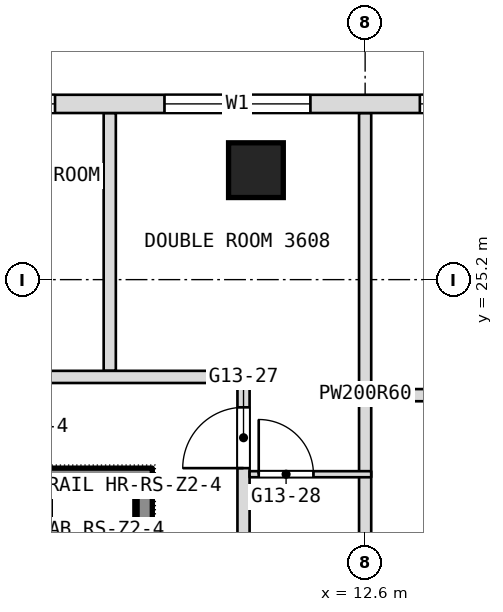
"""IFC4 building model, lengths in metres.
Left out: names, types, materials, properties, quantities, classifications, styles, units other than length and angle.
Written with IfcOpenShell. Run it as: python <this file> out.ifc"""

import sys

from ifc_helpers import new_model, si_unit, direction, frame, frame_2d, origin, origin_2d, place, context, subcontext, project, spatial, rectangle, extrude, element, fill, save


model = new_model("IFC4")
c1 = context("Model", 3, precision=1e-05, world=origin(), true_north=direction((0.0, 1.0)))
c2 = subcontext(c1, "Body", "Model", "MODEL_VIEW")
j1 = project(units=[si_unit("LENGTHUNIT", "METRE"), si_unit("PLANEANGLEUNIT", "RADIAN")], contexts=[c1])
p1 = place(None, origin())
s1 = spatial("IfcSite", under=j1, at=p1, CompositionType="ELEMENT")
p2 = place(p1, origin())
s2 = spatial("IfcBuilding", under=s1, at=p2, CompositionType="ELEMENT")
p3 = place(p2, frame((0.0, 0.0, 155.3)))
s3 = spatial("IfcBuildingStorey", under=s2, at=p3, CompositionType="ELEMENT", Elevation=155.3)
p4 = place(p3, frame((10.804, 27.0, 0.0), z_axis=(0.0, 0.0, 1.0), x_axis=(1.0, 0.0, 0.0)))
e1 = element("IfcColumn", 1, at=p4, inside=s3, PredefinedType="COLUMN", context=c2, shape_type="SweptSolid", body=[
    extrude(rectangle(XDim=0.9, YDim=0.9, at=origin_2d()), origin(), (0.0, 0.0, 1.0), 3.6),
])
p5 = place(p3, frame((12.6, 18.7, 0.0), z_axis=(0.0, 0.0, 1.0), x_axis=(0.0, 1.0, 0.0)))
e2 = element("IfcWall", 2, at=p5, inside=s3, PredefinedType="PARTITIONING", context=c2, shape_type="SweptSolid", body=[
    extrude(rectangle(XDim=9.24, YDim=0.2, at=frame_2d((4.62, 0.0))), origin(), (0.0, 0.0, 1.0), 3.34),
])
p6 = place(p3, frame((10.6, 18.5, 0.0), z_axis=(0.0, 0.0, 1.0), x_axis=(0.0, 1.0, 0.0)))
e3 = element("IfcWall", 3, at=p6, inside=s3, PredefinedType="PARTITIONING", context=c2, shape_type="SweptSolid", body=[
    extrude(rectangle(XDim=5.0, YDim=0.2, at=frame_2d((2.5, 0.0))), origin(), (0.0, 0.0, 1.0), 3.34),
])
p7 = place(p6, frame((3.6, 0.0, 0.0)))
e4 = element("IfcOpeningElement", 4, at=p7, cuts=e3, PredefinedType="OPENING", context=c2, shape_type="SweptSolid", body=[
    extrude(rectangle(XDim=1.0, YDim=2.1, at=frame_2d((0.5, 1.05))), frame((0.0, 0.1, 0.0), z_axis=(0.0, -1.0, 0.0), x_axis=(1.0, 0.0, 0.0)), (0.0, 0.0, 1.0), 0.2),
])
p8 = place(p3, frame((8.4, 23.7, 0.0), z_axis=(0.0, 0.0, 1.0), x_axis=(0.0, 1.0, 0.0)))
e5 = element("IfcWall", 5, at=p8, inside=s3, PredefinedType="PARTITIONING", context=c2, shape_type="SweptSolid", body=[
    extrude(rectangle(XDim=4.24, YDim=0.2, at=frame_2d((2.12, 0.0))), origin(), (0.0, 0.0, 1.0), 3.34),
])
p9 = place(p3, frame((10.7, 22.0, 0.0), z_axis=(0.0, 0.0, 1.0), x_axis=(1.0, 0.0, 0.0)))
e6 = element("IfcWall", 6, at=p9, inside=s3, PredefinedType="PARTITIONING", context=c2, shape_type="SweptSolid", body=[
    extrude(rectangle(XDim=2.0, YDim=0.1, at=frame_2d((1.0, 0.0))), origin(), (0.0, 0.0, 1.0), 3.34),
])
p10 = place(p9, frame((0.15, 0.0, 0.0)))
e7 = element("IfcOpeningElement", 7, at=p10, cuts=e6, PredefinedType="OPENING", context=c2, shape_type="SweptSolid", body=[
    extrude(rectangle(XDim=0.9, YDim=2.1, at=frame_2d((0.45, 1.05))), frame((0.0, 0.05, 0.0), z_axis=(0.0, -1.0, 0.0), x_axis=(1.0, 0.0, 0.0)), (0.0, 0.0, 1.0), 0.1),
])
p11 = place(p3, frame((12.7, 23.3, 0.0), z_axis=(0.0, 0.0, 1.0), x_axis=(1.0, 0.0, 0.0)))
e8 = element("IfcWall", 8, at=p11, inside=s3, PredefinedType="PARTITIONING", context=c2, shape_type="SweptSolid", body=[
    extrude(rectangle(XDim=4.0, YDim=0.2, at=frame_2d((2.0, 0.0))), origin(), (0.0, 0.0, 1.0), 3.34),
])
p12 = place(p3, frame((1.5, 23.6, 0.0), z_axis=(0.0, 0.0, 1.0), x_axis=(1.0, 0.0, 0.0)))
e9 = element("IfcWall", 9, at=p12, inside=s3, PredefinedType="PARTITIONING", context=c2, shape_type="SweptSolid", body=[
    extrude(rectangle(XDim=9.2, YDim=0.2, at=frame_2d((4.6, 0.0))), origin(), (0.0, 0.0, 1.0), 3.34),
])
p13 = place(p12, frame((4.3, 0.0, 0.0)))
e10 = element("IfcOpeningElement", 10, at=p13, cuts=e9, PredefinedType="OPENING", context=c2, shape_type="SweptSolid", body=[
    extrude(rectangle(XDim=1.0, YDim=2.1, at=frame_2d((0.5, 1.05))), frame((0.0, 0.1, 0.0), z_axis=(0.0, -1.0, 0.0), x_axis=(1.0, 0.0, 0.0)), (0.0, 0.0, 1.0), 0.2),
])
p14 = place(p3, frame((21.306, 28.09, 0.0), z_axis=(0.0, 0.0, 1.0), x_axis=(-1.0, 0.0, 0.0)))
e11 = element("IfcWall", 11, at=p14, inside=s3, PredefinedType="NOTDEFINED", context=c2, shape_type="SweptSolid", body=[
    extrude(rectangle(XDim=42.612, YDim=0.3, at=frame_2d((21.306, 0.0))), origin(), (0.0, 0.0, 1.0), 3.6),
])
p15 = place(p14, frame((5.406, 0.0, 0.9)))
e12 = element("IfcOpeningElement", 12, at=p15, cuts=e11, PredefinedType="OPENING", context=c2, shape_type="SweptSolid", body=[
    extrude(rectangle(XDim=2.4, YDim=2.1, at=frame_2d((1.2, 1.05))), frame((0.0, 0.15, 0.0), z_axis=(0.0, -1.0, 0.0), x_axis=(1.0, 0.0, 0.0)), (0.0, 0.0, 1.0), 0.3),
])
p16 = place(p14, frame((9.606, 0.0, 0.9)))
e13 = element("IfcOpeningElement", 13, at=p16, cuts=e11, PredefinedType="OPENING", context=c2, shape_type="SweptSolid", body=[
    extrude(rectangle(XDim=2.4, YDim=2.1, at=frame_2d((1.2, 1.05))), frame((0.0, 0.15, 0.0), z_axis=(0.0, -1.0, 0.0), x_axis=(1.0, 0.0, 0.0)), (0.0, 0.0, 1.0), 0.3),
])
p17 = place(p14, frame((13.806, 0.0, 0.9)))
e14 = element("IfcOpeningElement", 14, at=p17, cuts=e11, PredefinedType="OPENING", context=c2, shape_type="SweptSolid", body=[
    extrude(rectangle(XDim=2.4, YDim=2.1, at=frame_2d((1.2, 1.05))), frame((0.0, 0.15, 0.0), z_axis=(0.0, -1.0, 0.0), x_axis=(1.0, 0.0, 0.0)), (0.0, 0.0, 1.0), 0.3),
])
p18 = place(p14, frame((18.006, 0.0, 0.9)))
e15 = element("IfcOpeningElement", 15, at=p18, cuts=e11, PredefinedType="OPENING", context=c2, shape_type="SweptSolid", body=[
    extrude(rectangle(XDim=2.4, YDim=2.1, at=frame_2d((1.2, 1.05))), frame((0.0, 0.15, 0.0), z_axis=(0.0, -1.0, 0.0), x_axis=(1.0, 0.0, 0.0)), (0.0, 0.0, 1.0), 0.3),
])
p19 = place(p14, frame((22.206, 0.0, 0.9)))
e16 = element("IfcOpeningElement", 16, at=p19, cuts=e11, PredefinedType="OPENING", context=c2, shape_type="SweptSolid", body=[
    extrude(rectangle(XDim=2.4, YDim=2.1, at=frame_2d((1.2, 1.05))), frame((0.0, 0.15, 0.0), z_axis=(0.0, -1.0, 0.0), x_axis=(1.0, 0.0, 0.0)), (0.0, 0.0, 1.0), 0.3),
])
p20 = place(p14, frame((26.406, 0.0, 0.9)))
e17 = element("IfcOpeningElement", 17, at=p20, cuts=e11, PredefinedType="OPENING", context=c2, shape_type="SweptSolid", body=[
    extrude(rectangle(XDim=2.4, YDim=2.1, at=frame_2d((1.2, 1.05))), frame((0.0, 0.15, 0.0), z_axis=(0.0, -1.0, 0.0), x_axis=(1.0, 0.0, 0.0)), (0.0, 0.0, 1.0), 0.3),
])
p21 = place(p14, frame((30.606, 0.0, 0.9)))
e18 = element("IfcOpeningElement", 18, at=p21, cuts=e11, PredefinedType="OPENING", context=c2, shape_type="SweptSolid", body=[
    extrude(rectangle(XDim=2.4, YDim=2.1, at=frame_2d((1.2, 1.05))), frame((0.0, 0.15, 0.0), z_axis=(0.0, -1.0, 0.0), x_axis=(1.0, 0.0, 0.0)), (0.0, 0.0, 1.0), 0.3),
])
p22 = place(p14, frame((34.806, 0.0, 0.9)))
e19 = element("IfcOpeningElement", 19, at=p22, cuts=e11, PredefinedType="OPENING", context=c2, shape_type="SweptSolid", body=[
    extrude(rectangle(XDim=2.4, YDim=2.1, at=frame_2d((1.2, 1.05))), frame((0.0, 0.15, 0.0), z_axis=(0.0, -1.0, 0.0), x_axis=(1.0, 0.0, 0.0)), (0.0, 0.0, 1.0), 0.3),
])
p23 = place(p3, frame((2.9, 21.975, 0.1), z_axis=(0.0, 0.0, 1.0), x_axis=(1.0, 0.0, 0.0)))
e20 = element("IfcWall", 20, at=p23, inside=s3, PredefinedType="SHEAR", context=c2, shape_type="SweptSolid", body=[
    extrude(rectangle(XDim=6.2, YDim=0.25, at=frame_2d((3.1, 0.0))), origin(), (0.0, 0.0, 1.0), 3.6),
])
p24 = place(p3, frame((8.975, 18.95, 0.1), z_axis=(0.0, 0.0, 1.0), x_axis=(0.0, 1.0, 0.0)))
e21 = element("IfcWall", 21, at=p24, inside=s3, PredefinedType="SHEAR", context=c2, shape_type="SweptSolid", body=[
    extrude(rectangle(XDim=2.9, YDim=0.25, at=frame_2d((1.45, 0.0))), origin(), (0.0, 0.0, 1.0), 3.6),
])
p25 = place(p7, origin())
e22 = element("IfcDoor", 22, at=p25, inside=s3, OperationType="SINGLE_SWING_LEFT", PredefinedType="DOOR", context=c2, shape_type="SweptSolid", body=[
    extrude(rectangle(XDim=1.0, YDim=2.1, at=frame_2d((0.5, 1.05))), frame((0.0, 0.025, 0.0), z_axis=(0.0, -1.0, 0.0), x_axis=(1.0, 0.0, 0.0)), (0.0, 0.0, 1.0), 0.05),
])
fill(e4, e22)
p26 = place(p10, origin())
e23 = element("IfcDoor", 23, at=p26, inside=s3, OperationType="SINGLE_SWING_RIGHT", PredefinedType="DOOR", context=c2, shape_type="SweptSolid", body=[
    extrude(rectangle(XDim=0.9, YDim=2.1, at=frame_2d((0.45, 1.05))), frame((0.0, 0.025, 0.0), z_axis=(0.0, -1.0, 0.0), x_axis=(1.0, 0.0, 0.0)), (0.0, 0.0, 1.0), 0.05),
])
fill(e7, e23)
p27 = place(p15, origin())
e24 = element("IfcWindow", 24, at=p27, inside=s3, PartitioningType="SINGLE_PANEL", PredefinedType="WINDOW", context=c2, shape_type="SweptSolid", body=[
    extrude(rectangle(XDim=2.4, YDim=2.1, at=frame_2d((1.2, 1.05))), frame((0.0, 0.03, 0.0), z_axis=(0.0, -1.0, 0.0), x_axis=(1.0, 0.0, 0.0)), (0.0, 0.0, 1.0), 0.06),
])
fill(e12, e24)
p28 = place(p16, origin())
e25 = element("IfcWindow", 25, at=p28, inside=s3, PartitioningType="SINGLE_PANEL", PredefinedType="WINDOW", context=c2, shape_type="SweptSolid", body=[
    extrude(rectangle(XDim=2.4, YDim=2.1, at=frame_2d((1.2, 1.05))), frame((0.0, 0.03, 0.0), z_axis=(0.0, -1.0, 0.0), x_axis=(1.0, 0.0, 0.0)), (0.0, 0.0, 1.0), 0.06),
])
fill(e13, e25)
p29 = place(p17, origin())
e26 = element("IfcWindow", 26, at=p29, inside=s3, PartitioningType="SINGLE_PANEL", PredefinedType="WINDOW", context=c2, shape_type="SweptSolid", body=[
    extrude(rectangle(XDim=2.4, YDim=2.1, at=frame_2d((1.2, 1.05))), frame((0.0, 0.03, 0.0), z_axis=(0.0, -1.0, 0.0), x_axis=(1.0, 0.0, 0.0)), (0.0, 0.0, 1.0), 0.06),
])
fill(e14, e26)
save(model, sys.argv[1])
